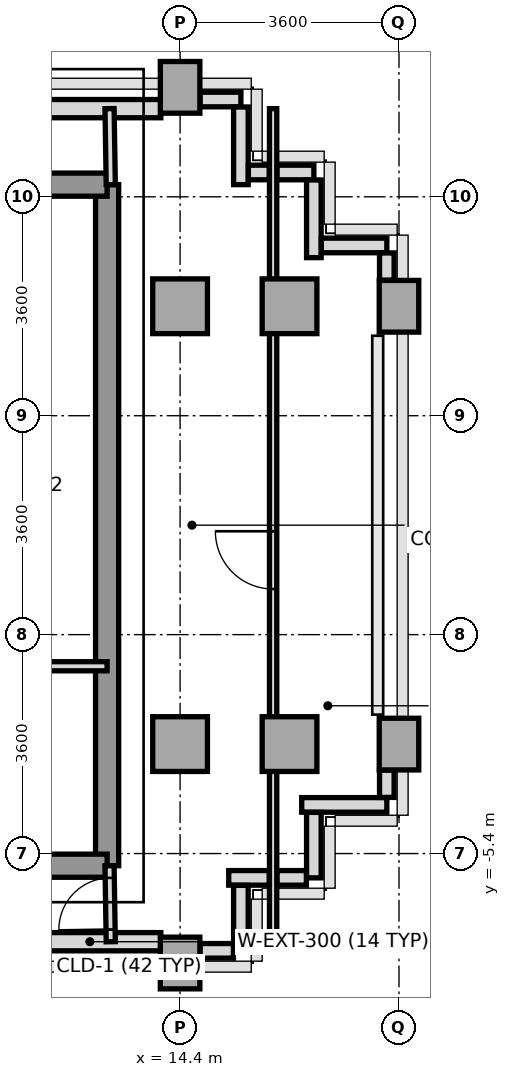
"""IFC4 building model, lengths in metres.
Left out: names, types, materials, properties, quantities, classifications, styles, units other than length and angle.
Written with IfcOpenShell. Run it as: python <this file> out.ifc"""

import sys

from ifc_helpers import new_model, si_unit, direction, frame, frame_2d, origin, origin_2d, place, context, subcontext, project, spatial, rectangle, extrude, source, transform, mapped, element, fill, save


model = new_model("IFC4")
c1 = context("Model", 3, precision=1e-05, world=origin(), true_north=direction((0.0, 1.0)))
c2 = subcontext(c1, "Body", "Model", "MODEL_VIEW")
j1 = project(units=[si_unit("LENGTHUNIT", "METRE"), si_unit("PLANEANGLEUNIT", "RADIAN")], contexts=[c1])
p1 = place(None, origin())
s1 = spatial("IfcSite", under=j1, at=p1, CompositionType="ELEMENT")
p2 = place(p1, origin())
s2 = spatial("IfcBuilding", under=s1, at=p2, CompositionType="ELEMENT")
p3 = place(p2, frame((0.0, 0.0, 180.8)))
s3 = spatial("IfcBuildingStorey", under=s2, at=p3, CompositionType="ELEMENT", Elevation=180.8)
m1 = source(origin(), c2, "Body", "SweptSolid", [
    extrude(rectangle(XDim=0.65, YDim=0.85, at=origin_2d()), origin(), (0.0, 0.0, 1.0), 3.2),
])
p4 = place(p3, frame((14.4, -7.2, 0.0), z_axis=(0.0, 0.0, 1.0), x_axis=(1.0, 0.0, 0.0)))
e1 = element("IfcColumn", 1, at=p4, inside=s3, PredefinedType="COLUMN", context=c2, shape_type="MappedRepresentation", body=[
    mapped(m1, transform((0.0, 0.0, 0.0), x_axis=(1.0, 0.0, 0.0), y_axis=(0.0, 1.0, 0.0), z_axis=(0.0, 0.0, 1.0), scale=1.0)),
])
m2 = source(origin(), c2, "Body", "SweptSolid", [
    extrude(rectangle(XDim=0.9, YDim=0.9, at=origin_2d()), origin(), (0.0, 0.0, 1.0), 3.2),
])
for number, where, z_axis, x_axis in (
    (2, (14.4, -3.6, 0.0), (0.0, 0.0, 1.0), (1.0, 0.0, 0.0)),
    (3, (14.4, 3.6, 0.0), (0.0, 0.0, 1.0), (1.0, 0.0, 0.0)),
):
    element("IfcColumn", number, at=place(p3, frame(where, z_axis=z_axis, x_axis=x_axis)), inside=s3, PredefinedType="COLUMN", context=c2, shape_type="MappedRepresentation", body=[
        mapped(m2, transform((0.0, 0.0, 0.0), x_axis=(1.0, 0.0, 0.0), y_axis=(0.0, 1.0, 0.0), z_axis=(0.0, 0.0, 1.0), scale=1.0)),
    ])
p5 = place(p3, frame((14.4, 7.2, 0.0), z_axis=(0.0, 0.0, 1.0), x_axis=(1.0, 0.0, 0.0)))
e4 = element("IfcColumn", 4, at=p5, inside=s3, PredefinedType="COLUMN", context=c2, shape_type="MappedRepresentation", body=[
    mapped(m1, transform((0.0, 0.0, 0.0), x_axis=(1.0, 0.0, 0.0), y_axis=(0.0, 1.0, 0.0), z_axis=(0.0, 0.0, 1.0), scale=1.0)),
])
for number, where, z_axis, x_axis in (
    (5, (16.2, -3.6, 0.0), (0.0, 0.0, 1.0), (1.0, 0.0, 0.0)),
    (6, (16.2, 3.6, 0.0), (0.0, 0.0, 1.0), (1.0, 0.0, 0.0)),
):
    element("IfcColumn", number, at=place(p3, frame(where, z_axis=z_axis, x_axis=x_axis)), inside=s3, PredefinedType="COLUMN", context=c2, shape_type="MappedRepresentation", body=[
        mapped(m2, transform((0.0, 0.0, 0.0), x_axis=(1.0, 0.0, 0.0), y_axis=(0.0, 1.0, 0.0), z_axis=(0.0, 0.0, 1.0), scale=1.0)),
    ])
for number, where, z_axis, x_axis in (
    (7, (18.0, -3.6, 0.0), (0.0, 0.0, 1.0), (1.0, 0.0, 0.0)),
    (8, (18.0, 3.6, 0.0), (0.0, 0.0, 1.0), (1.0, 0.0, 0.0)),
):
    element("IfcColumn", number, at=place(p3, frame(where, z_axis=z_axis, x_axis=x_axis)), inside=s3, PredefinedType="COLUMN", context=c2, shape_type="MappedRepresentation", body=[
        mapped(m1, transform((0.0, 0.0, 0.0), x_axis=(1.0, 0.0, 0.0), y_axis=(0.0, 1.0, 0.0), z_axis=(0.0, 0.0, 1.0), scale=1.0)),
    ])
p6 = place(p3, frame((11.448, 6.85, 0.0), z_axis=(0.0, 0.0, 1.0), x_axis=(1.0, 0.0, 0.0)))
e9 = element("IfcWall", 9, at=p6, inside=s3, PredefinedType="SOLIDWALL", context=c2, shape_type="SweptSolid", body=[
    extrude(rectangle(XDim=2.635, YDim=0.3, at=frame_2d((1.317, 0.0))), origin(), (0.0, 0.0, 1.0), 3.2),
])
p7 = place(p3, frame((11.75, -6.85, 0.0), z_axis=(0.0, 0.0, 1.0), x_axis=(1.0, 0.0, 0.0)))
e10 = element("IfcWall", 10, at=p7, inside=s3, PredefinedType="SOLIDWALL", context=c2, shape_type="SweptSolid", body=[
    extrude(rectangle(XDim=2.333, YDim=0.3, at=frame_2d((1.167, 0.0))), origin(), (0.0, 0.0, 1.0), 3.2),
])
p8 = place(p3, frame((17.8, -4.6, 0.0), z_axis=(0.0, 0.0, 1.0), x_axis=(-1.0, 0.0, 0.0)))
e11 = element("IfcWall", 11, at=p8, inside=s3, PredefinedType="PARAPET", context=c2, shape_type="SweptSolid", body=[
    extrude(rectangle(XDim=1.4, YDim=0.24, at=frame_2d((0.7, 0.0))), origin(), (0.0, 0.0, 1.0), 1.15),
])
p9 = place(p3, frame((16.6, -4.723, 0.0), z_axis=(0.0, 0.0, 1.0), x_axis=(0.0, -1.0, 0.0)))
e12 = element("IfcWall", 12, at=p9, inside=s3, PredefinedType="PARAPET", context=c2, shape_type="SweptSolid", body=[
    extrude(rectangle(XDim=1.077, YDim=0.24, at=frame_2d((0.539, 0.0))), origin(), (0.0, 0.0, 1.0), 1.15),
])
p10 = place(p3, frame((16.477, -5.8, 0.0), z_axis=(0.0, 0.0, 1.0), x_axis=(-1.0, 0.0, 0.0)))
e13 = element("IfcWall", 13, at=p10, inside=s3, PredefinedType="PARAPET", context=c2, shape_type="SweptSolid", body=[
    extrude(rectangle(XDim=0.484, YDim=0.24, at=frame_2d((0.242, 0.0))), origin(), (0.0, 0.0, 1.0), 1.15),
])
p11 = place(p3, frame((15.867, -5.8, 0.0), z_axis=(0.0, 0.0, 1.0), x_axis=(-1.0, 0.0, 0.0)))
e14 = element("IfcWall", 14, at=p11, inside=s3, PredefinedType="PARAPET", context=c2, shape_type="SweptSolid", body=[
    extrude(rectangle(XDim=0.667, YDim=0.24, at=frame_2d((0.333, 0.0))), origin(), (0.0, 0.0, 1.0), 1.15),
])
p12 = place(p3, frame((15.4, -5.923, 0.0), z_axis=(0.0, 0.0, 1.0), x_axis=(0.0, -1.0, 0.0)))
e15 = element("IfcWall", 15, at=p12, inside=s3, PredefinedType="PARAPET", context=c2, shape_type="SweptSolid", body=[
    extrude(rectangle(XDim=1.077, YDim=0.24, at=frame_2d((0.539, 0.0))), origin(), (0.0, 0.0, 1.0), 1.15),
])
p13 = place(p3, frame((15.277, -7.0, 0.0), z_axis=(0.0, 0.0, 1.0), x_axis=(-1.0, 0.0, 0.0)))
e16 = element("IfcWall", 16, at=p13, inside=s3, PredefinedType="PARAPET", context=c2, shape_type="SweptSolid", body=[
    extrude(rectangle(XDim=0.549, YDim=0.24, at=frame_2d((0.274, 0.0))), origin(), (0.0, 0.0, 1.0), 1.15),
])
p14 = place(p3, frame((14.728, 7.0, 0.0), z_axis=(0.0, 0.0, 1.0), x_axis=(1.0, 0.0, 0.0)))
e17 = element("IfcWall", 17, at=p14, inside=s3, PredefinedType="PARAPET", context=c2, shape_type="SweptSolid", body=[
    extrude(rectangle(XDim=0.672, YDim=0.24, at=frame_2d((0.336, 0.0))), origin(), (0.0, 0.0, 1.0), 1.15),
])
p15 = place(p3, frame((15.4, 6.877, 0.0), z_axis=(0.0, 0.0, 1.0), x_axis=(0.0, -1.0, 0.0)))
e18 = element("IfcWall", 18, at=p15, inside=s3, PredefinedType="PARAPET", context=c2, shape_type="SweptSolid", body=[
    extrude(rectangle(XDim=1.277, YDim=0.24, at=frame_2d((0.638, 0.0))), origin(), (0.0, 0.0, 1.0), 1.15),
])
p16 = place(p3, frame((15.523, 5.8, 0.0), z_axis=(0.0, 0.0, 1.0), x_axis=(1.0, 0.0, 0.0)))
e19 = element("IfcWall", 19, at=p16, inside=s3, PredefinedType="PARAPET", context=c2, shape_type="SweptSolid", body=[
    extrude(rectangle(XDim=0.344, YDim=0.24, at=frame_2d((0.172, 0.0))), origin(), (0.0, 0.0, 1.0), 1.15),
])
p17 = place(p3, frame((15.993, 5.8, 0.0), z_axis=(0.0, 0.0, 1.0), x_axis=(1.0, 0.0, 0.0)))
e20 = element("IfcWall", 20, at=p17, inside=s3, PredefinedType="PARAPET", context=c2, shape_type="SweptSolid", body=[
    extrude(rectangle(XDim=0.607, YDim=0.24, at=frame_2d((0.304, 0.0))), origin(), (0.0, 0.0, 1.0), 1.15),
])
p18 = place(p3, frame((16.6, 5.677, 0.0), z_axis=(0.0, 0.0, 1.0), x_axis=(0.0, -1.0, 0.0)))
e21 = element("IfcWall", 21, at=p18, inside=s3, PredefinedType="PARAPET", context=c2, shape_type="SweptSolid", body=[
    extrude(rectangle(XDim=1.277, YDim=0.24, at=frame_2d((0.639, 0.0))), origin(), (0.0, 0.0, 1.0), 1.15),
])
p19 = place(p3, frame((16.723, 4.6, 0.0), z_axis=(0.0, 0.0, 1.0), x_axis=(1.0, 0.0, 0.0)))
e22 = element("IfcWall", 22, at=p19, inside=s3, PredefinedType="PARAPET", context=c2, shape_type="SweptSolid", body=[
    extrude(rectangle(XDim=1.077, YDim=0.24, at=frame_2d((0.539, 0.0))), origin(), (0.0, 0.0, 1.0), 1.15),
])
for number, where, z_axis, x_axis in (
    (23, (17.8, 4.477, 0.0), (0.0, 0.0, 1.0), (0.0, -1.0, 0.0)),
    (24, (17.8, -4.028, 0.0), (0.0, 0.0, 1.0), (0.0, -1.0, 0.0)),
):
    element("IfcWall", number, at=place(p3, frame(where, z_axis=z_axis, x_axis=x_axis)), inside=s3, PredefinedType="PARAPET", context=c2, shape_type="SweptSolid", body=[
        extrude(rectangle(XDim=0.449, YDim=0.24, at=frame_2d((0.225, 0.0))), origin(), (0.0, 0.0, 1.0), 1.15),
    ])
p20 = place(p3, frame((13.2, -5.6, 0.0), z_axis=(0.0, 0.0, 1.0), x_axis=(0.0, 1.0, 0.0)))
e25 = element("IfcWall", 25, at=p20, inside=s3, PredefinedType="SHEAR", context=c2, shape_type="SweptSolid", body=[
    extrude(rectangle(XDim=11.2, YDim=0.38, at=frame_2d((5.6, 0.0))), origin(), (0.0, 0.0, 1.0), 3.2),
])
p21 = place(p3, frame((11.356, 5.6, 0.0), z_axis=(0.0, 0.0, 1.0), x_axis=(1.0, 0.0, 0.0)))
e26 = element("IfcWall", 26, at=p21, inside=s3, PredefinedType="SHEAR", context=c2, shape_type="SweptSolid", body=[
    extrude(rectangle(XDim=1.844, YDim=0.38, at=frame_2d((0.922, 0.0))), origin(), (0.0, 0.0, 1.0), 3.2),
])
p22 = place(p3, frame((5.4, -5.6, 0.0), z_axis=(0.0, 0.0, 1.0), x_axis=(1.0, 0.0, 0.0)))
e27 = element("IfcWall", 27, at=p22, inside=s3, PredefinedType="SHEAR", context=c2, shape_type="SweptSolid", body=[
    extrude(rectangle(XDim=7.8, YDim=0.38, at=frame_2d((3.9, 0.0))), origin(), (0.0, 0.0, 1.0), 3.2),
])
p23 = place(p22, frame((5.85, 0.0, 0.0)))
e28 = element("IfcOpeningElement", 28, at=p23, cuts=e27, PredefinedType="OPENING", context=c2, shape_type="SweptSolid", body=[
    extrude(rectangle(XDim=0.8, YDim=2.1, at=frame_2d((0.4, 1.05))), frame((0.0, 0.2, 0.0), z_axis=(0.0, -1.0, 0.0), x_axis=(1.0, 0.0, 0.0)), (0.0, 0.0, 1.0), 0.4),
])
p24 = place(p3, frame((11.02, -2.32, 0.0), z_axis=(0.0, 0.0, 1.0), x_axis=(1.0, 0.0, 0.0)))
e29 = element("IfcWall", 29, at=p24, inside=s3, PredefinedType="PARTITIONING", context=c2, shape_type="SweptSolid", body=[
    extrude(rectangle(XDim=2.18, YDim=0.15, at=frame_2d((1.09, 0.0))), origin(), (0.0, 0.0, 1.0), 3.2),
])
p25 = place(p3, frame((13.26, 5.6, 0.0), z_axis=(0.0, 0.0, 1.0), x_axis=(-0.016013571389, 0.999871774545, 0.0)))
e30 = element("IfcWall", 30, at=p25, inside=s3, PredefinedType="PARTITIONING", context=c2, shape_type="SweptSolid", body=[
    extrude(rectangle(XDim=1.25, YDim=0.15, at=frame_2d((0.625, 0.0))), origin(), (0.0, 0.0, 1.0), 3.2),
])
p26 = place(p3, frame((13.26, -6.85, 0.0), z_axis=(0.0, 0.0, 1.0), x_axis=(-0.016013571389, 0.999871774545, 0.0)))
e31 = element("IfcWall", 31, at=p26, inside=s3, PredefinedType="PARTITIONING", context=c2, shape_type="SweptSolid", body=[
    extrude(rectangle(XDim=1.25, YDim=0.15, at=frame_2d((0.625, 0.0))), origin(), (0.0, 0.0, 1.0), 3.2),
])
p27 = place(p26, frame((0.2, 0.0, 0.0)))
e32 = element("IfcOpeningElement", 32, at=p27, cuts=e31, PredefinedType="OPENING", context=c2, shape_type="SweptSolid", body=[
    extrude(rectangle(XDim=0.85, YDim=2.1, at=frame_2d((0.425, 1.05))), frame((0.0, 0.085, 0.0), z_axis=(0.0, -1.0, 0.0), x_axis=(1.0, 0.0, 0.0)), (0.0, 0.0, 1.0), 0.17),
])
p28 = place(p3, frame((15.93, -6.85, 0.0), z_axis=(0.0, 0.0, 1.0), x_axis=(0.0, 1.0, 0.0)))
e33 = element("IfcWall", 33, at=p28, inside=s3, PredefinedType="PARTITIONING", context=c2, shape_type="SweptSolid", body=[
    extrude(rectangle(XDim=13.7, YDim=0.12, at=frame_2d((6.85, 0.0))), origin(), (0.0, 0.0, 1.0), 3.2),
])
p29 = place(p28, frame((5.8, 0.0, 0.0)))
e34 = element("IfcOpeningElement", 34, at=p29, cuts=e33, PredefinedType="OPENING", context=c2, shape_type="SweptSolid", body=[
    extrude(rectangle(XDim=0.95, YDim=2.15, at=frame_2d((0.475, 1.075))), frame((0.0, 0.07, 0.0), z_axis=(0.0, -1.0, 0.0), x_axis=(1.0, 0.0, 0.0)), (0.0, 0.0, 1.0), 0.14),
])
m3 = source(origin(), c2, "Body", "SweptSolid", [
    extrude(rectangle(XDim=0.85, YDim=2.1, at=frame_2d((0.425, 1.05))), frame((0.0, 0.025, 0.0), z_axis=(0.0, -1.0, 0.0), x_axis=(1.0, 0.0, 0.0)), (0.0, 0.0, 1.0), 0.05),
])
p30 = place(p27, origin())
e35 = element("IfcDoor", 35, at=p30, inside=s3, OperationType="SINGLE_SWING_LEFT", PredefinedType="DOOR", context=c2, shape_type="MappedRepresentation", body=[
    mapped(m3, transform((0.0, 0.0, 0.0), x_axis=(1.0, 0.0, 0.0), y_axis=(0.0, 1.0, 0.0), z_axis=(0.0, 0.0, 1.0), scale=1.0)),
])
fill(e32, e35)
m4 = source(origin(), c2, "Body", "SweptSolid", [
    extrude(rectangle(XDim=0.95, YDim=2.15, at=frame_2d((0.475, 1.075))), frame((0.0, 0.025, 0.0), z_axis=(0.0, -1.0, 0.0), x_axis=(1.0, 0.0, 0.0)), (0.0, 0.0, 1.0), 0.05),
])
p31 = place(p29, origin())
e36 = element("IfcDoor", 36, at=p31, inside=s3, OperationType="SINGLE_SWING_RIGHT", PredefinedType="DOOR", context=c2, shape_type="MappedRepresentation", body=[
    mapped(m4, transform((0.0, 0.0, 0.0), x_axis=(1.0, 0.0, 0.0), y_axis=(0.0, 1.0, 0.0), z_axis=(0.0, 0.0, 1.0), scale=1.0)),
])
fill(e34, e36)
save(model, sys.argv[1])
